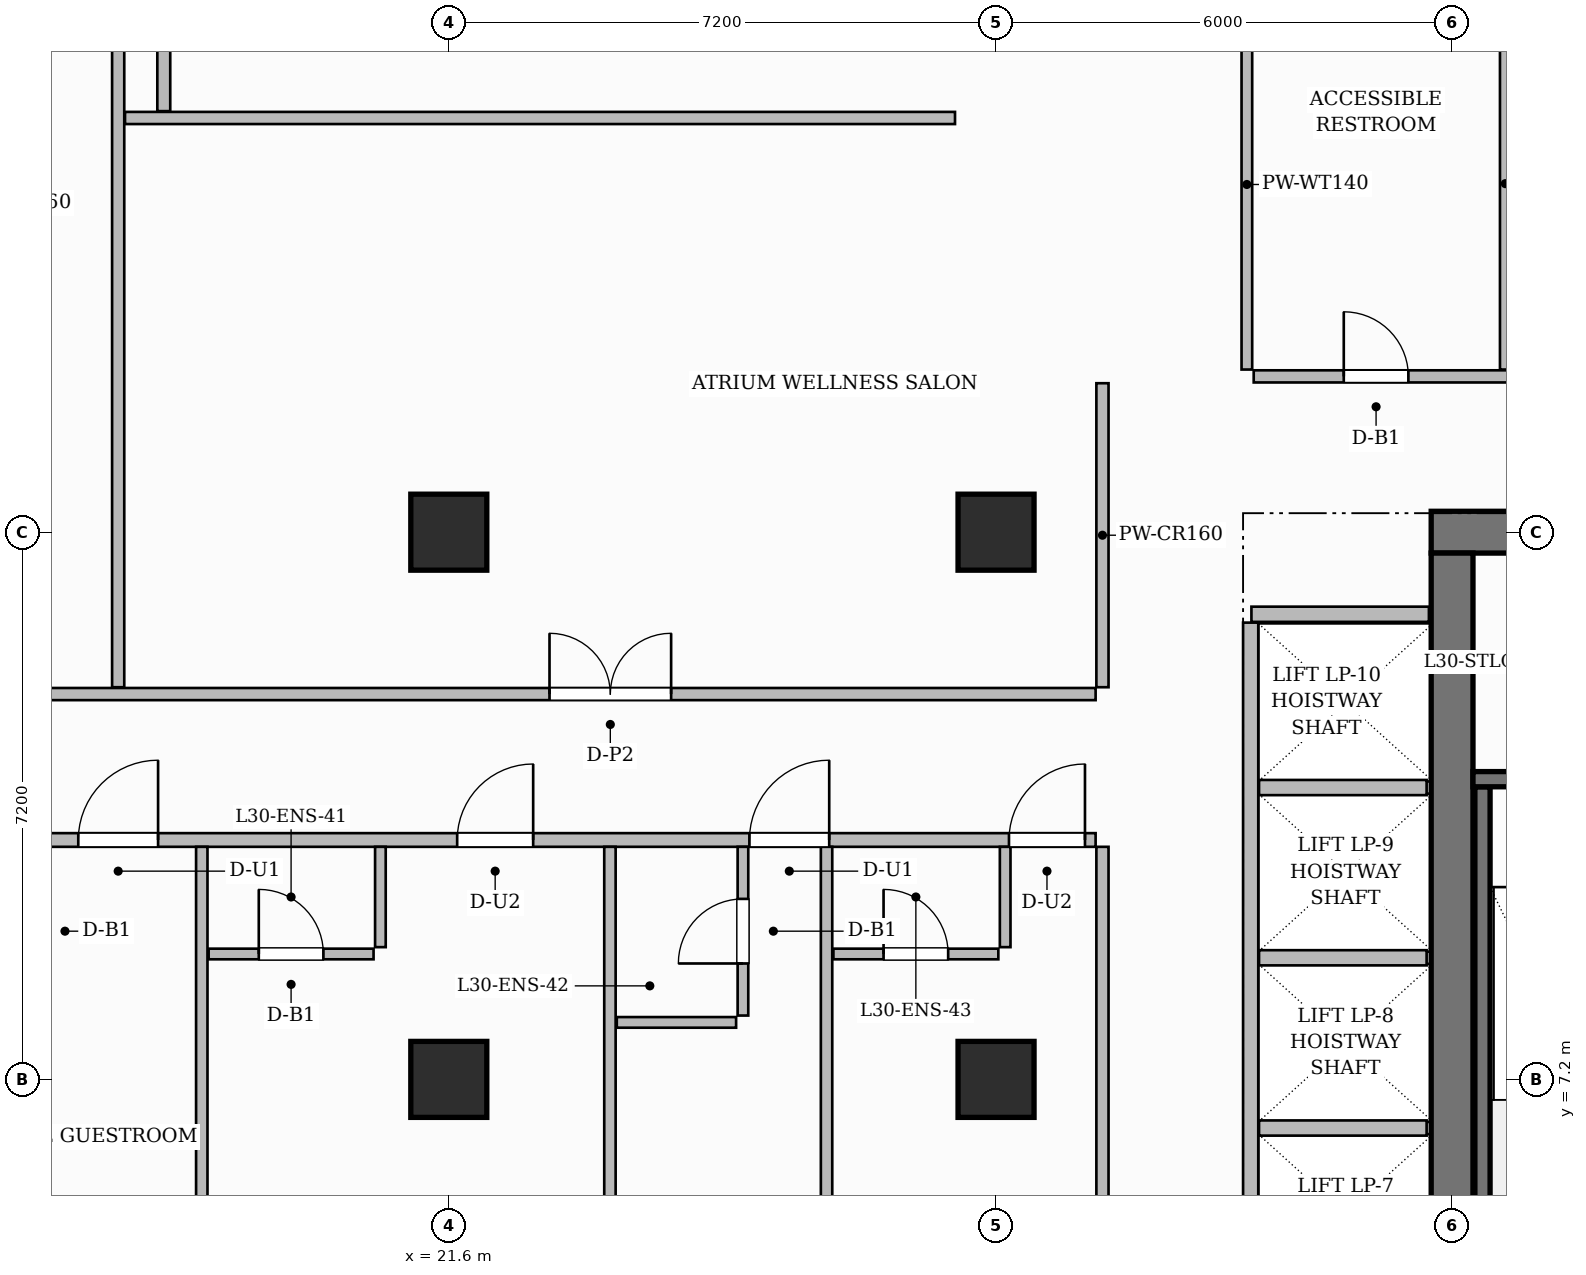
"""IFC4 building model, lengths in metres.
Left out: names, types, materials, properties, quantities, classifications, styles, units other than length and angle.
Written with IfcOpenShell. Run it as: python <this file> out.ifc"""

import sys

from ifc_helpers import new_model, si_unit, direction, frame, frame_2d, origin, origin_2d, place, context, subcontext, project, spatial, rectangle, extrude, source, transform, mapped, element, fill, save


model = new_model("IFC4")
c1 = context("Model", 3, precision=1e-05, world=origin(), true_north=direction((0.0, 1.0)))
c2 = subcontext(c1, "Body", "Model", "MODEL_VIEW")
j1 = project(units=[si_unit("LENGTHUNIT", "METRE"), si_unit("PLANEANGLEUNIT", "RADIAN")], contexts=[c1])
p1 = place(None, origin())
s1 = spatial("IfcSite", under=j1, at=p1, CompositionType="ELEMENT")
p2 = place(p1, origin())
s2 = spatial("IfcBuilding", under=s1, at=p2, CompositionType="ELEMENT")
p3 = place(p2, frame((0.0, 0.0, 122.9)))
s3 = spatial("IfcBuildingStorey", under=s2, at=p3, CompositionType="ELEMENT", Elevation=122.9)
p4 = place(p3, frame((34.525, 14.4, 0.0), z_axis=(0.0, 0.0, 1.0), x_axis=(1.0, 0.0, 0.0)))
e1 = element("IfcWall", 1, at=p4, inside=s3, PredefinedType="SHEAR", context=c2, shape_type="SweptSolid", body=[
    extrude(rectangle(XDim=15.55, YDim=0.55, at=frame_2d((7.775, 0.0))), origin(), (0.0, 0.0, 1.0), 3.7),
])
p5 = place(p4, frame((5.405, 0.0, 0.0)))
e2 = element("IfcOpeningElement", 2, at=p5, cuts=e1, PredefinedType="OPENING", context=c2, shape_type="SweptSolid", body=[
    extrude(rectangle(XDim=1.5, YDim=2.2, at=frame_2d((0.75, 1.1))), frame((0.0, 0.285, 0.0), z_axis=(0.0, -1.0, 0.0), x_axis=(1.0, 0.0, 0.0)), (0.0, 0.0, 1.0), 0.57),
])
p6 = place(p4, frame((1.62, 0.0, 0.0)))
e3 = element("IfcOpeningElement", 3, at=p6, cuts=e1, PredefinedType="OPENING", context=c2, shape_type="SweptSolid", body=[
    extrude(rectangle(XDim=1.05, YDim=2.15, at=frame_2d((0.525, 1.075))), frame((0.0, 0.285, 0.0), z_axis=(0.0, -1.0, 0.0), x_axis=(1.0, 0.0, 0.0)), (0.0, 0.0, 1.0), 0.57),
])
p7 = place(p4, frame((11.25, 0.0, 0.0)))
e4 = element("IfcOpeningElement", 4, at=p7, cuts=e1, PredefinedType="OPENING", context=c2, shape_type="SweptSolid", body=[
    extrude(rectangle(XDim=1.05, YDim=2.15, at=frame_2d((0.525, 1.075))), frame((0.0, 0.285, 0.0), z_axis=(0.0, -1.0, 0.0), x_axis=(1.0, 0.0, 0.0)), (0.0, 0.0, 1.0), 0.57),
])
p8 = place(p3, frame((34.8, 3.875, 0.0), z_axis=(0.0, 0.0, 1.0), x_axis=(0.0, 1.0, 0.0)))
e5 = element("IfcWall", 5, at=p8, inside=s3, PredefinedType="SHEAR", context=c2, shape_type="SweptSolid", body=[
    extrude(rectangle(XDim=10.25, YDim=0.55, at=frame_2d((5.125, 0.0))), origin(), (0.0, 0.0, 1.0), 3.7),
])
m1 = source(origin(), c2, "Body", "SweptSolid", [
    extrude(rectangle(XDim=1.0, YDim=1.0, at=origin_2d()), origin(), (0.0, 0.0, 1.0), 3.7),
])
for number, where, z_axis, x_axis in (
    (6, (21.6, 7.2, 0.0), (0.0, 0.0, 1.0), (1.0, 0.0, 0.0)),
    (7, (21.6, 14.4, 0.0), (0.0, 0.0, 1.0), (1.0, 0.0, 0.0)),
    (8, (28.8, 7.2, 0.0), (0.0, 0.0, 1.0), (1.0, 0.0, 0.0)),
    (9, (28.8, 14.4, 0.0), (0.0, 0.0, 1.0), (1.0, 0.0, 0.0)),
):
    element("IfcColumn", number, at=place(p3, frame(where, z_axis=z_axis, x_axis=x_axis)), inside=s3, PredefinedType="COLUMN", context=c2, shape_type="MappedRepresentation", body=[
        mapped(m1, transform((0.0, 0.0, 0.0), scale=1.0)),
    ])
p9 = place(p3, frame((35.2, 4.1, 0.0), z_axis=(0.0, 0.0, 1.0), x_axis=(0.0, 1.0, 0.0)))
e10 = element("IfcWall", 10, at=p9, inside=s3, PredefinedType="SHEAR", context=c2, shape_type="SweptSolid", body=[
    extrude(rectangle(XDim=6.95, YDim=0.2, at=frame_2d((3.475, 0.0))), origin(), (0.0, 0.0, 1.0), 3.7),
])
p10 = place(p3, frame((35.075, 11.15, 0.0), z_axis=(0.0, 0.0, 1.0), x_axis=(1.0, 0.0, 0.0)))
e11 = element("IfcWall", 11, at=p10, inside=s3, PredefinedType="SHEAR", context=c2, shape_type="SweptSolid", body=[
    extrude(rectangle(XDim=3.165, YDim=0.2, at=frame_2d((1.583, 0.0))), origin(), (0.0, 0.0, 1.0), 3.7),
])
p11 = place(p10, frame((1.07, 0.0, 0.0)))
e12 = element("IfcOpeningElement", 12, at=p11, cuts=e11, PredefinedType="OPENING", context=c2, shape_type="SweptSolid", body=[
    extrude(rectangle(XDim=1.05, YDim=2.2, at=frame_2d((0.525, 1.1))), frame((0.0, 0.11, 0.0), z_axis=(0.0, -1.0, 0.0), x_axis=(1.0, 0.0, 0.0)), (0.0, 0.0, 1.0), 0.22),
])
p12 = place(p3, frame((32.16, 13.32, 0.0), z_axis=(0.0, 0.0, 1.0), x_axis=(1.0, 0.0, 0.0)))
e13 = element("IfcWall", 13, at=p12, inside=s3, PredefinedType="PARTITIONING", context=c2, shape_type="SweptSolid", body=[
    extrude(rectangle(XDim=2.335, YDim=0.2, at=frame_2d((1.167, 0.0))), origin(), (0.0, 0.0, 1.0), 3.45),
])
p13 = place(p3, frame((32.15, 4.39, 0.0), z_axis=(0.0, 0.0, 1.0), x_axis=(0.0, 1.0, 0.0)))
e14 = element("IfcWall", 14, at=p13, inside=s3, PredefinedType="PARTITIONING", context=c2, shape_type="SweptSolid", body=[
    extrude(rectangle(XDim=8.82, YDim=0.2, at=frame_2d((4.41, 0.0))), origin(), (0.0, 0.0, 1.0), 3.45),
])
for number, where, z_axis, x_axis in (
    (15, (32.26, 6.56, 0.0), (0.0, 0.0, 1.0), (1.0, 0.0, 0.0)),
    (16, (32.26, 8.8, 0.0), (0.0, 0.0, 1.0), (1.0, 0.0, 0.0)),
    (17, (32.26, 11.04, 0.0), (0.0, 0.0, 1.0), (1.0, 0.0, 0.0)),
):
    element("IfcWall", number, at=place(p3, frame(where, z_axis=z_axis, x_axis=x_axis)), inside=s3, PredefinedType="PARTITIONING", context=c2, shape_type="SweptSolid", body=[
        extrude(rectangle(XDim=2.205, YDim=0.2, at=frame_2d((1.103, 0.0))), origin(), (0.0, 0.0, 1.0), 3.45),
    ])
p14 = place(p3, frame((14.568, 10.35, 0.0), z_axis=(0.0, 0.0, 1.0), x_axis=(1.0, 0.0, 0.0)))
e18 = element("IfcWall", 18, at=p14, inside=s3, PredefinedType="PARTITIONING", context=c2, shape_type="SweptSolid", body=[
    extrude(rectangle(XDim=15.542, YDim=0.18, at=frame_2d((7.771, 0.0))), origin(), (0.0, 0.0, 1.0), 3.45),
])
p15 = place(p14, frame((2.157, 0.0, 0.0)))
e19 = element("IfcOpeningElement", 19, at=p15, cuts=e18, PredefinedType="OPENING", context=c2, shape_type="SweptSolid", body=[
    extrude(rectangle(XDim=1.05, YDim=2.25, at=frame_2d((0.525, 1.125))), frame((0.0, 0.1, 0.0), z_axis=(0.0, -1.0, 0.0), x_axis=(1.0, 0.0, 0.0)), (0.0, 0.0, 1.0), 0.2),
])
p16 = place(p14, frame((7.142, 0.0, 0.0)))
e20 = element("IfcOpeningElement", 20, at=p16, cuts=e18, PredefinedType="OPENING", context=c2, shape_type="SweptSolid", body=[
    extrude(rectangle(XDim=1.0, YDim=2.2, at=frame_2d((0.5, 1.1))), frame((0.0, 0.1, 0.0), z_axis=(0.0, -1.0, 0.0), x_axis=(1.0, 0.0, 0.0)), (0.0, 0.0, 1.0), 0.2),
])
p17 = place(p14, frame((10.987, 0.0, 0.0)))
e21 = element("IfcOpeningElement", 21, at=p17, cuts=e18, PredefinedType="OPENING", context=c2, shape_type="SweptSolid", body=[
    extrude(rectangle(XDim=1.05, YDim=2.25, at=frame_2d((0.525, 1.125))), frame((0.0, 0.1, 0.0), z_axis=(0.0, -1.0, 0.0), x_axis=(1.0, 0.0, 0.0)), (0.0, 0.0, 1.0), 0.2),
])
p18 = place(p14, frame((14.402, 0.0, 0.0)))
e22 = element("IfcOpeningElement", 22, at=p18, cuts=e18, PredefinedType="OPENING", context=c2, shape_type="SweptSolid", body=[
    extrude(rectangle(XDim=1.0, YDim=2.2, at=frame_2d((0.5, 1.1))), frame((0.0, 0.1, 0.0), z_axis=(0.0, -1.0, 0.0), x_axis=(1.0, 0.0, 0.0)), (0.0, 0.0, 1.0), 0.2),
])
p19 = place(p3, frame((14.568, 12.27, 0.0), z_axis=(0.0, 0.0, 1.0), x_axis=(1.0, 0.0, 0.0)))
e23 = element("IfcWall", 23, at=p19, inside=s3, PredefinedType="PARTITIONING", context=c2, shape_type="SweptSolid", body=[
    extrude(rectangle(XDim=15.542, YDim=0.16, at=frame_2d((7.771, 0.0))), origin(), (0.0, 0.0, 1.0), 3.45),
])
p20 = place(p19, frame((8.357, 0.0, 0.0)))
e24 = element("IfcOpeningElement", 24, at=p20, cuts=e23, PredefinedType="OPENING", context=c2, shape_type="SweptSolid", body=[
    extrude(rectangle(XDim=1.6, YDim=2.4, at=frame_2d((0.8, 1.2))), frame((0.0, 0.09, 0.0), z_axis=(0.0, -1.0, 0.0), x_axis=(1.0, 0.0, 0.0)), (0.0, 0.0, 1.0), 0.18),
])
p21 = place(p3, frame((30.2, 12.36, 0.0), z_axis=(0.0, 0.0, 1.0), x_axis=(0.0, 1.0, 0.0)))
e25 = element("IfcWall", 25, at=p21, inside=s3, PredefinedType="PARTITIONING", context=c2, shape_type="SweptSolid", body=[
    extrude(rectangle(XDim=4.0, YDim=0.16, at=frame_2d((2.0, 0.0))), origin(), (0.0, 0.0, 1.0), 3.45),
])
p22 = place(p3, frame((32.19, 16.45, 0.0), z_axis=(0.0, 0.0, 1.0), x_axis=(1.0, 0.0, 0.0)))
e26 = element("IfcWall", 26, at=p22, inside=s3, PredefinedType="PARTITIONING", context=c2, shape_type="SweptSolid", body=[
    extrude(rectangle(XDim=17.47, YDim=0.16, at=frame_2d((8.735, 0.0))), origin(), (0.0, 0.0, 1.0), 3.45),
])
p23 = place(p22, frame((1.185, 0.0, 0.0)))
e27 = element("IfcOpeningElement", 27, at=p23, cuts=e26, PredefinedType="OPENING", context=c2, shape_type="SweptSolid", body=[
    extrude(rectangle(XDim=0.85, YDim=2.1, at=frame_2d((0.425, 1.05))), frame((0.0, 0.09, 0.0), z_axis=(0.0, -1.0, 0.0), x_axis=(1.0, 0.0, 0.0)), (0.0, 0.0, 1.0), 0.18),
])
p24 = place(p22, frame((5.71, 0.0, 0.0)))
e28 = element("IfcOpeningElement", 28, at=p24, cuts=e26, PredefinedType="OPENING", context=c2, shape_type="SweptSolid", body=[
    extrude(rectangle(XDim=0.9, YDim=2.15, at=frame_2d((0.45, 1.075))), frame((0.0, 0.09, 0.0), z_axis=(0.0, -1.0, 0.0), x_axis=(1.0, 0.0, 0.0)), (0.0, 0.0, 1.0), 0.18),
])
p25 = place(p22, frame((12.56, 0.0, 0.0)))
e29 = element("IfcOpeningElement", 29, at=p25, cuts=e26, PredefinedType="OPENING", context=c2, shape_type="SweptSolid", body=[
    extrude(rectangle(XDim=1.4, YDim=2.35, at=frame_2d((0.7, 1.175))), frame((0.0, 0.09, 0.0), z_axis=(0.0, -1.0, 0.0), x_axis=(1.0, 0.0, 0.0)), (0.0, 0.0, 1.0), 0.18),
])
p26 = place(p3, frame((30.2, 0.168, 0.0), z_axis=(0.0, 0.0, 1.0), x_axis=(0.0, 1.0, 0.0)))
e30 = element("IfcWall", 30, at=p26, inside=s3, PredefinedType="PARTITIONING", context=c2, shape_type="SweptSolid", body=[
    extrude(rectangle(XDim=10.092, YDim=0.16, at=frame_2d((5.046, 0.0))), origin(), (0.0, 0.0, 1.0), 3.45),
])
p27 = place(p26, frame((1.957, 0.0, 0.0)))
e31 = element("IfcOpeningElement", 31, at=p27, cuts=e30, PredefinedType="OPENING", context=c2, shape_type="SweptSolid", body=[
    extrude(rectangle(XDim=1.05, YDim=2.15, at=frame_2d((0.525, 1.075))), frame((0.0, 0.09, 0.0), z_axis=(0.0, -1.0, 0.0), x_axis=(1.0, 0.0, 0.0)), (0.0, 0.0, 1.0), 0.18),
])
p28 = place(p3, frame((32.1, 16.54, 0.0), z_axis=(0.0, 0.0, 1.0), x_axis=(0.0, 1.0, 0.0)))
e32 = element("IfcWall", 32, at=p28, inside=s3, PredefinedType="PARTITIONING", context=c2, shape_type="SweptSolid", body=[
    extrude(rectangle(XDim=4.87, YDim=0.14, at=frame_2d((2.435, 0.0))), origin(), (0.0, 0.0, 1.0), 3.45),
])
p29 = place(p3, frame((35.5, 16.54, 0.0), z_axis=(0.0, 0.0, 1.0), x_axis=(0.0, 1.0, 0.0)))
e33 = element("IfcWall", 33, at=p29, inside=s3, PredefinedType="PARTITIONING", context=c2, shape_type="SweptSolid", body=[
    extrude(rectangle(XDim=4.892, YDim=0.14, at=frame_2d((2.446, 0.0))), origin(), (0.0, 0.0, 1.0), 3.45),
])
p30 = place(p3, frame((18.35, 0.168, 0.0), z_axis=(0.0, 0.0, 1.0), x_axis=(0.0, 1.0, 0.0)))
e34 = element("IfcWall", 34, at=p30, inside=s3, PredefinedType="PARTITIONING", context=c2, shape_type="SweptSolid", body=[
    extrude(rectangle(XDim=10.092, YDim=0.15, at=frame_2d((5.046, 0.0))), origin(), (0.0, 0.0, 1.0), 3.45),
])
p31 = place(p3, frame((20.7, 8.94, 0.0), z_axis=(0.0, 0.0, 1.0), x_axis=(0.0, 1.0, 0.0)))
e35 = element("IfcWall", 35, at=p31, inside=s3, PredefinedType="PARTITIONING", context=c2, shape_type="SweptSolid", body=[
    extrude(rectangle(XDim=1.32, YDim=0.14, at=frame_2d((0.66, 0.0))), origin(), (0.0, 0.0, 1.0), 3.45),
])
p32 = place(p3, frame((18.44, 8.85, 0.0), z_axis=(0.0, 0.0, 1.0), x_axis=(1.0, 0.0, 0.0)))
e36 = element("IfcWall", 36, at=p32, inside=s3, PredefinedType="PARTITIONING", context=c2, shape_type="SweptSolid", body=[
    extrude(rectangle(XDim=2.17, YDim=0.14, at=frame_2d((1.085, 0.0))), origin(), (0.0, 0.0, 1.0), 3.45),
])
p33 = place(p32, frame((0.66, 0.0, 0.0)))
e37 = element("IfcOpeningElement", 37, at=p33, cuts=e36, PredefinedType="OPENING", context=c2, shape_type="SweptSolid", body=[
    extrude(rectangle(XDim=0.85, YDim=2.1, at=frame_2d((0.425, 1.05))), frame((0.0, 0.08, 0.0), z_axis=(0.0, -1.0, 0.0), x_axis=(1.0, 0.0, 0.0)), (0.0, 0.0, 1.0), 0.16),
])
p34 = place(p3, frame((23.72, 0.168, 0.0), z_axis=(0.0, 0.0, 1.0), x_axis=(0.0, 1.0, 0.0)))
e38 = element("IfcWall", 38, at=p34, inside=s3, PredefinedType="PARTITIONING", context=c2, shape_type="SweptSolid", body=[
    extrude(rectangle(XDim=10.092, YDim=0.15, at=frame_2d((5.046, 0.0))), origin(), (0.0, 0.0, 1.0), 3.45),
])
p35 = place(p3, frame((25.47, 8.04, 0.0), z_axis=(0.0, 0.0, 1.0), x_axis=(0.0, 1.0, 0.0)))
e39 = element("IfcWall", 39, at=p35, inside=s3, PredefinedType="PARTITIONING", context=c2, shape_type="SweptSolid", body=[
    extrude(rectangle(XDim=2.22, YDim=0.14, at=frame_2d((1.11, 0.0))), origin(), (0.0, 0.0, 1.0), 3.45),
])
p36 = place(p35, frame((0.685, 0.0, 0.0)))
e40 = element("IfcOpeningElement", 40, at=p36, cuts=e39, PredefinedType="OPENING", context=c2, shape_type="SweptSolid", body=[
    extrude(rectangle(XDim=0.85, YDim=2.1, at=frame_2d((0.425, 1.05))), frame((0.0, 0.08, 0.0), z_axis=(0.0, -1.0, 0.0), x_axis=(1.0, 0.0, 0.0)), (0.0, 0.0, 1.0), 0.16),
])
p37 = place(p3, frame((23.81, 7.95, 0.0), z_axis=(0.0, 0.0, 1.0), x_axis=(1.0, 0.0, 0.0)))
e41 = element("IfcWall", 41, at=p37, inside=s3, PredefinedType="PARTITIONING", context=c2, shape_type="SweptSolid", body=[
    extrude(rectangle(XDim=1.57, YDim=0.14, at=frame_2d((0.785, 0.0))), origin(), (0.0, 0.0, 1.0), 3.45),
])
p38 = place(p3, frame((26.57, 0.168, 0.0), z_axis=(0.0, 0.0, 1.0), x_axis=(0.0, 1.0, 0.0)))
e42 = element("IfcWall", 42, at=p38, inside=s3, PredefinedType="PARTITIONING", context=c2, shape_type="SweptSolid", body=[
    extrude(rectangle(XDim=10.092, YDim=0.15, at=frame_2d((5.046, 0.0))), origin(), (0.0, 0.0, 1.0), 3.45),
])
p39 = place(p3, frame((28.92, 8.94, 0.0), z_axis=(0.0, 0.0, 1.0), x_axis=(0.0, 1.0, 0.0)))
e43 = element("IfcWall", 43, at=p39, inside=s3, PredefinedType="PARTITIONING", context=c2, shape_type="SweptSolid", body=[
    extrude(rectangle(XDim=1.32, YDim=0.14, at=frame_2d((0.66, 0.0))), origin(), (0.0, 0.0, 1.0), 2.935),
])
p40 = place(p3, frame((26.66, 8.85, 0.0), z_axis=(0.0, 0.0, 1.0), x_axis=(1.0, 0.0, 0.0)))
e44 = element("IfcWall", 44, at=p40, inside=s3, PredefinedType="PARTITIONING", context=c2, shape_type="SweptSolid", body=[
    extrude(rectangle(XDim=2.17, YDim=0.14, at=frame_2d((1.085, 0.0))), origin(), (0.0, 0.0, 1.0), 3.45),
])
p41 = place(p40, frame((0.66, 0.0, 0.0)))
e45 = element("IfcOpeningElement", 45, at=p41, cuts=e44, PredefinedType="OPENING", context=c2, shape_type="SweptSolid", body=[
    extrude(rectangle(XDim=0.85, YDim=2.1, at=frame_2d((0.425, 1.05))), frame((0.0, 0.08, 0.0), z_axis=(0.0, -1.0, 0.0), x_axis=(1.0, 0.0, 0.0)), (0.0, 0.0, 1.0), 0.16),
])
p42 = place(p3, frame((17.25, 12.36, 0.0), z_axis=(0.0, 0.0, 1.0), x_axis=(0.0, 1.0, 0.0)))
e46 = element("IfcWall", 46, at=p42, inside=s3, PredefinedType="PARTITIONING", context=c2, shape_type="SweptSolid", body=[
    extrude(rectangle(XDim=12.75, YDim=0.16, at=frame_2d((6.375, 0.0))), origin(), (0.0, 0.0, 1.0), 3.45),
])
p43 = place(p3, frame((17.85, 19.94, 0.0), z_axis=(0.0, 0.0, 1.0), x_axis=(0.0, 1.0, 0.0)))
e47 = element("IfcWall", 47, at=p43, inside=s3, PredefinedType="PARTITIONING", context=c2, shape_type="SweptSolid", body=[
    extrude(rectangle(XDim=5.22, YDim=0.17, at=frame_2d((2.61, 0.0))), origin(), (0.0, 0.0, 1.0), 3.105),
])
p44 = place(p3, frame((17.34, 19.85, 0.0), z_axis=(0.0, 0.0, 1.0), x_axis=(1.0, 0.0, 0.0)))
e48 = element("IfcWall", 48, at=p44, inside=s3, PredefinedType="PARTITIONING", context=c2, shape_type="SweptSolid", body=[
    extrude(rectangle(XDim=10.92, YDim=0.16, at=frame_2d((5.46, 0.0))), origin(), (0.0, 0.0, 1.0), 3.45),
])
m2 = source(origin(), c2, "Body", "SweptSolid", [
    extrude(rectangle(XDim=0.85, YDim=2.1, at=frame_2d((0.425, 1.05))), frame((0.0, 0.025, 0.0), z_axis=(0.0, -1.0, 0.0), x_axis=(1.0, 0.0, 0.0)), (0.0, 0.0, 1.0), 0.05),
])
p45 = place(p23, origin())
e49 = element("IfcDoor", 49, at=p45, inside=s3, OperationType="SINGLE_SWING_LEFT", PredefinedType="DOOR", context=c2, shape_type="MappedRepresentation", body=[
    mapped(m2, transform((0.0, 0.0, 0.0), scale=1.0)),
])
fill(e27, e49)
m3 = source(origin(), c2, "Body", "SweptSolid", [
    extrude(rectangle(XDim=1.05, YDim=2.25, at=frame_2d((0.525, 1.125))), frame((0.0, 0.025, 0.0), z_axis=(0.0, -1.0, 0.0), x_axis=(1.0, 0.0, 0.0)), (0.0, 0.0, 1.0), 0.05),
])
p46 = place(p15, origin())
e50 = element("IfcDoor", 50, at=p46, inside=s3, OperationType="SINGLE_SWING_RIGHT", PredefinedType="DOOR", context=c2, shape_type="MappedRepresentation", body=[
    mapped(m3, transform((0.0, 0.0, 0.0), scale=1.0)),
])
fill(e19, e50)
p47 = place(p33, origin())
e51 = element("IfcDoor", 51, at=p47, inside=s3, OperationType="SINGLE_SWING_LEFT", PredefinedType="DOOR", context=c2, shape_type="MappedRepresentation", body=[
    mapped(m2, transform((0.0, 0.0, 0.0), scale=1.0)),
])
fill(e37, e51)
m4 = source(origin(), c2, "Body", "SweptSolid", [
    extrude(rectangle(XDim=1.0, YDim=2.2, at=frame_2d((0.5, 1.1))), frame((0.0, 0.025, 0.0), z_axis=(0.0, -1.0, 0.0), x_axis=(1.0, 0.0, 0.0)), (0.0, 0.0, 1.0), 0.05),
])
p48 = place(p16, origin())
e52 = element("IfcDoor", 52, at=p48, inside=s3, OperationType="SINGLE_SWING_RIGHT", PredefinedType="DOOR", context=c2, shape_type="MappedRepresentation", body=[
    mapped(m4, transform((0.0, 0.0, 0.0), scale=1.0)),
])
fill(e20, e52)
p49 = place(p36, origin())
e53 = element("IfcDoor", 53, at=p49, inside=s3, OperationType="SINGLE_SWING_LEFT", PredefinedType="DOOR", context=c2, shape_type="MappedRepresentation", body=[
    mapped(m2, transform((0.0, 0.0, 0.0), scale=1.0)),
])
fill(e40, e53)
p50 = place(p17, origin())
e54 = element("IfcDoor", 54, at=p50, inside=s3, OperationType="SINGLE_SWING_RIGHT", PredefinedType="DOOR", context=c2, shape_type="MappedRepresentation", body=[
    mapped(m3, transform((0.0, 0.0, 0.0), scale=1.0)),
])
fill(e21, e54)
p51 = place(p41, origin())
e55 = element("IfcDoor", 55, at=p51, inside=s3, OperationType="SINGLE_SWING_LEFT", PredefinedType="DOOR", context=c2, shape_type="MappedRepresentation", body=[
    mapped(m2, transform((0.0, 0.0, 0.0), scale=1.0)),
])
fill(e45, e55)
p52 = place(p18, origin())
e56 = element("IfcDoor", 56, at=p52, inside=s3, OperationType="SINGLE_SWING_RIGHT", PredefinedType="DOOR", context=c2, shape_type="MappedRepresentation", body=[
    mapped(m4, transform((0.0, 0.0, 0.0), scale=1.0)),
])
fill(e22, e56)
m5 = source(origin(), c2, "Body", "SweptSolid", [
    extrude(rectangle(XDim=1.6, YDim=2.4, at=frame_2d((0.8, 1.2))), frame((0.0, 0.025, 0.0), z_axis=(0.0, -1.0, 0.0), x_axis=(1.0, 0.0, 0.0)), (0.0, 0.0, 1.0), 0.05),
])
p53 = place(p20, origin())
e57 = element("IfcDoor", 57, at=p53, inside=s3, OperationType="DOUBLE_DOOR_SINGLE_SWING", PredefinedType="DOOR", context=c2, shape_type="MappedRepresentation", body=[
    mapped(m5, transform((0.0, 0.0, 0.0), scale=1.0)),
])
fill(e24, e57)
save(model, sys.argv[1])
